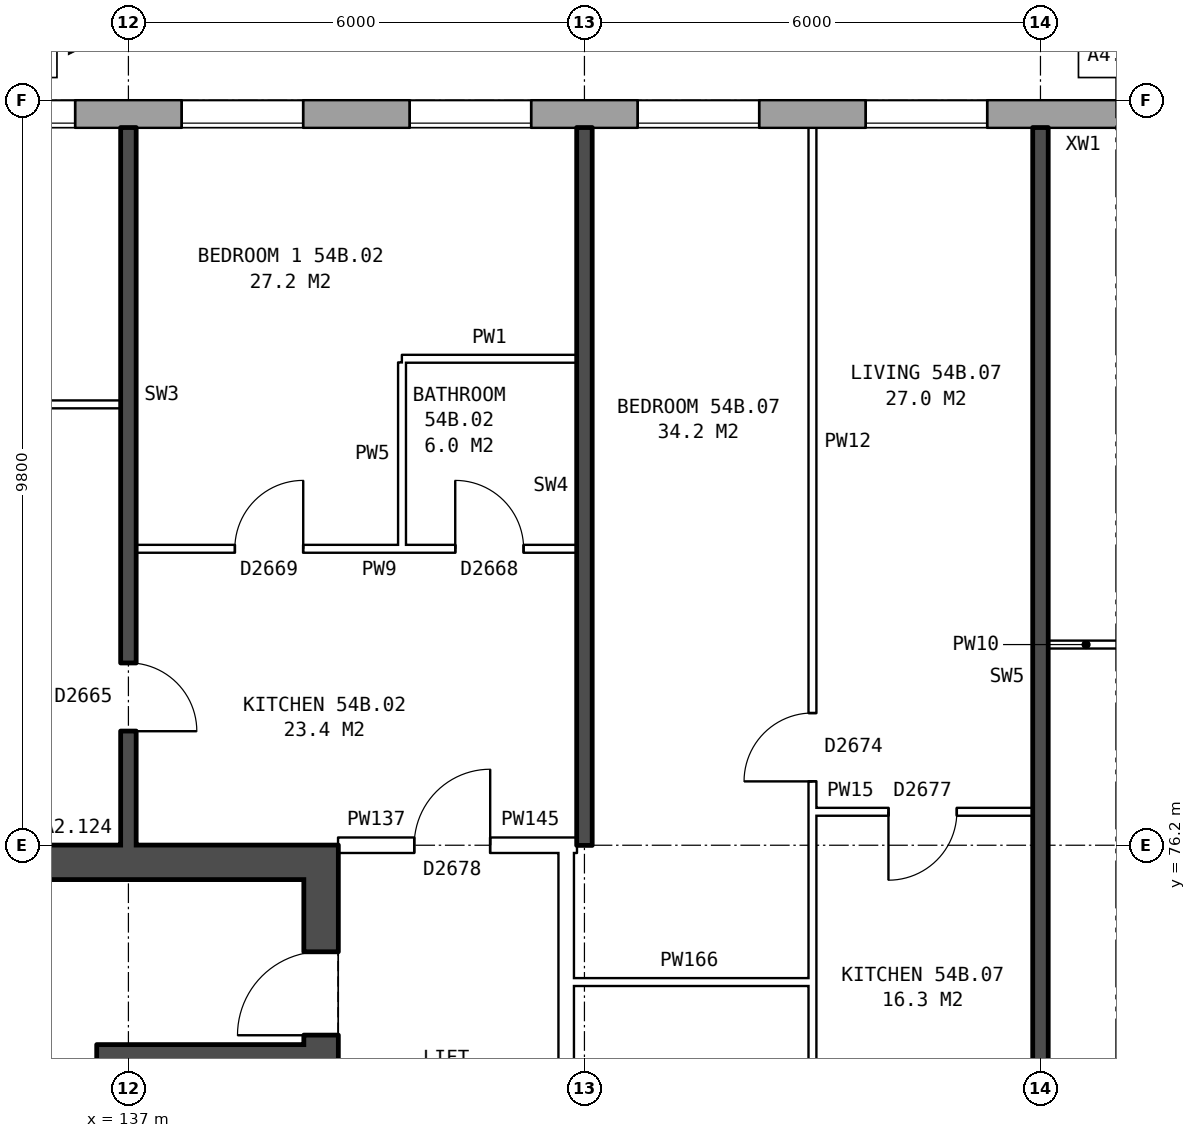
"""IFC4 building model, lengths in metres.
Left out: names, types, materials, properties, quantities, classifications, styles, units other than length and angle.
Written with IfcOpenShell. Run it as: python <this file> out.ifc"""

import sys

from ifc_helpers import new_model, si_unit, direction, frame, frame_2d, origin, place, context, subcontext, project, spatial, rectangle, extrude, element, fill, save


model = new_model("IFC4")
c1 = context("Model", 3, precision=1e-05, world=origin(), true_north=direction((0.0, 1.0)))
c2 = subcontext(c1, "Body", "Model", "MODEL_VIEW")
j1 = project(units=[si_unit("LENGTHUNIT", "METRE"), si_unit("PLANEANGLEUNIT", "RADIAN")], contexts=[c1])
p1 = place(None, origin())
s1 = spatial("IfcSite", under=j1, at=p1, CompositionType="ELEMENT")
p2 = place(p1, origin())
s2 = spatial("IfcBuilding", under=s1, at=p2, CompositionType="ELEMENT")
p3 = place(p2, frame((0.0, 0.0, 191.3)))
s3 = spatial("IfcBuildingStorey", under=s2, at=p3, CompositionType="ELEMENT", Elevation=191.3)
p4 = place(p3, frame((167.175, 85.82, 0.0), z_axis=(0.0, 0.0, 1.0), x_axis=(-1.0, 0.0, 0.0)))
e1 = element("IfcWall", 1, at=p4, inside=s3, PredefinedType="STANDARD", context=c2, shape_type="SweptSolid", body=[
    extrude(rectangle(XDim=33.101, YDim=0.36, at=frame_2d((16.55, 0.0))), origin(), (0.0, 0.0, 1.0), 2.85),
])
p5 = place(p4, frame((0.875, 0.0, 0.8)))
e2 = element("IfcOpeningElement", 2, at=p5, cuts=e1, PredefinedType="OPENING", context=c2, shape_type="SweptSolid", body=[
    extrude(rectangle(XDim=1.6, YDim=1.8, at=frame_2d((0.8, 0.9))), frame((0.0, 0.19, 0.0), z_axis=(0.0, -1.0, 0.0), x_axis=(1.0, 0.0, 0.0)), (0.0, 0.0, 1.0), 0.38),
])
p6 = place(p4, frame((3.875, 0.0, 0.8)))
e3 = element("IfcOpeningElement", 3, at=p6, cuts=e1, PredefinedType="OPENING", context=c2, shape_type="SweptSolid", body=[
    extrude(rectangle(XDim=1.6, YDim=1.8, at=frame_2d((0.8, 0.9))), frame((0.0, 0.19, 0.0), z_axis=(0.0, -1.0, 0.0), x_axis=(1.0, 0.0, 0.0)), (0.0, 0.0, 1.0), 0.38),
])
p7 = place(p4, frame((6.875, 0.0, 0.8)))
e4 = element("IfcOpeningElement", 4, at=p7, cuts=e1, PredefinedType="OPENING", context=c2, shape_type="SweptSolid", body=[
    extrude(rectangle(XDim=1.6, YDim=1.8, at=frame_2d((0.8, 0.9))), frame((0.0, 0.19, 0.0), z_axis=(0.0, -1.0, 0.0), x_axis=(1.0, 0.0, 0.0)), (0.0, 0.0, 1.0), 0.38),
])
p8 = place(p4, frame((9.875, 0.0, 0.8)))
e5 = element("IfcOpeningElement", 5, at=p8, cuts=e1, PredefinedType="OPENING", context=c2, shape_type="SweptSolid", body=[
    extrude(rectangle(XDim=1.6, YDim=1.8, at=frame_2d((0.8, 0.9))), frame((0.0, 0.19, 0.0), z_axis=(0.0, -1.0, 0.0), x_axis=(1.0, 0.0, 0.0)), (0.0, 0.0, 1.0), 0.38),
])
p9 = place(p4, frame((12.875, 0.0, 0.8)))
e6 = element("IfcOpeningElement", 6, at=p9, cuts=e1, PredefinedType="OPENING", context=c2, shape_type="SweptSolid", body=[
    extrude(rectangle(XDim=1.6, YDim=1.8, at=frame_2d((0.8, 0.9))), frame((0.0, 0.19, 0.0), z_axis=(0.0, -1.0, 0.0), x_axis=(1.0, 0.0, 0.0)), (0.0, 0.0, 1.0), 0.38),
])
p10 = place(p4, frame((15.925, 0.0, 0.15)))
e7 = element("IfcOpeningElement", 7, at=p10, cuts=e1, PredefinedType="OPENING", context=c2, shape_type="SweptSolid", body=[
    extrude(rectangle(XDim=1.2, YDim=1.2, at=frame_2d((0.6, 0.6))), frame((0.0, 0.19, 0.0), z_axis=(0.0, -1.0, 0.0), x_axis=(1.0, 0.0, 0.0)), (0.0, 0.0, 1.0), 0.38),
])
p11 = place(p4, frame((18.875, 0.0, 0.8)))
e8 = element("IfcOpeningElement", 8, at=p11, cuts=e1, PredefinedType="OPENING", context=c2, shape_type="SweptSolid", body=[
    extrude(rectangle(XDim=1.6, YDim=1.8, at=frame_2d((0.8, 0.9))), frame((0.0, 0.19, 0.0), z_axis=(0.0, -1.0, 0.0), x_axis=(1.0, 0.0, 0.0)), (0.0, 0.0, 1.0), 0.38),
])
p12 = place(p4, frame((21.875, 0.0, 0.8)))
e9 = element("IfcOpeningElement", 9, at=p12, cuts=e1, PredefinedType="OPENING", context=c2, shape_type="SweptSolid", body=[
    extrude(rectangle(XDim=1.6, YDim=1.8, at=frame_2d((0.8, 0.9))), frame((0.0, 0.19, 0.0), z_axis=(0.0, -1.0, 0.0), x_axis=(1.0, 0.0, 0.0)), (0.0, 0.0, 1.0), 0.38),
])
p13 = place(p4, frame((24.875, 0.0, 0.8)))
e10 = element("IfcOpeningElement", 10, at=p13, cuts=e1, PredefinedType="OPENING", context=c2, shape_type="SweptSolid", body=[
    extrude(rectangle(XDim=1.6, YDim=1.8, at=frame_2d((0.8, 0.9))), frame((0.0, 0.19, 0.0), z_axis=(0.0, -1.0, 0.0), x_axis=(1.0, 0.0, 0.0)), (0.0, 0.0, 1.0), 0.38),
])
p14 = place(p4, frame((27.875, 0.0, 0.8)))
e11 = element("IfcOpeningElement", 11, at=p14, cuts=e1, PredefinedType="OPENING", context=c2, shape_type="SweptSolid", body=[
    extrude(rectangle(XDim=1.6, YDim=1.8, at=frame_2d((0.8, 0.9))), frame((0.0, 0.19, 0.0), z_axis=(0.0, -1.0, 0.0), x_axis=(1.0, 0.0, 0.0)), (0.0, 0.0, 1.0), 0.38),
])
p15 = place(p4, frame((30.875, 0.0, 0.8)))
e12 = element("IfcOpeningElement", 12, at=p15, cuts=e1, PredefinedType="OPENING", context=c2, shape_type="SweptSolid", body=[
    extrude(rectangle(XDim=1.6, YDim=1.8, at=frame_2d((0.8, 0.9))), frame((0.0, 0.19, 0.0), z_axis=(0.0, -1.0, 0.0), x_axis=(1.0, 0.0, 0.0)), (0.0, 0.0, 1.0), 0.38),
])
p16 = place(p3, frame((139.535, 63.8, 0.0), z_axis=(0.0, 0.0, 1.0), x_axis=(0.0, 1.0, 0.0)))
e13 = element("IfcWall", 13, at=p16, inside=s3, PredefinedType="SHEAR", context=c2, shape_type="SweptSolid", body=[
    extrude(rectangle(XDim=12.4, YDim=0.45, at=frame_2d((6.2, 0.0))), origin(), (0.0, 0.0, 1.0), 2.85),
])
p17 = place(p16, frame((1.325, 0.0, 0.0)))
e14 = element("IfcOpeningElement", 14, at=p17, cuts=e13, PredefinedType="OPENING", context=c2, shape_type="SweptSolid", body=[
    extrude(rectangle(XDim=1.1, YDim=2.1, at=frame_2d((0.55, 1.05))), frame((0.0, 0.235, 0.0), z_axis=(0.0, -1.0, 0.0), x_axis=(1.0, 0.0, 0.0)), (0.0, 0.0, 1.0), 0.47),
])
p18 = place(p16, frame((3.6, 0.0, 0.0)))
e15 = element("IfcOpeningElement", 15, at=p18, cuts=e13, PredefinedType="OPENING", context=c2, shape_type="SweptSolid", body=[
    extrude(rectangle(XDim=1.1, YDim=2.1, at=frame_2d((0.55, 1.05))), frame((0.0, 0.235, 0.0), z_axis=(0.0, -1.0, 0.0), x_axis=(1.0, 0.0, 0.0)), (0.0, 0.0, 1.0), 0.47),
])
p19 = place(p16, frame((5.8, 0.0, 0.0)))
e16 = element("IfcOpeningElement", 16, at=p19, cuts=e13, PredefinedType="OPENING", context=c2, shape_type="SweptSolid", body=[
    extrude(rectangle(XDim=1.1, YDim=2.1, at=frame_2d((0.55, 1.05))), frame((0.0, 0.235, 0.0), z_axis=(0.0, -1.0, 0.0), x_axis=(1.0, 0.0, 0.0)), (0.0, 0.0, 1.0), 0.47),
])
p20 = place(p16, frame((9.9, 0.0, 0.0)))
e17 = element("IfcOpeningElement", 17, at=p20, cuts=e13, PredefinedType="OPENING", context=c2, shape_type="SweptSolid", body=[
    extrude(rectangle(XDim=1.1, YDim=2.1, at=frame_2d((0.55, 1.05))), frame((0.0, 0.235, 0.0), z_axis=(0.0, -1.0, 0.0), x_axis=(1.0, 0.0, 0.0)), (0.0, 0.0, 1.0), 0.47),
])
p21 = place(p16, frame((8.125, 0.0, 0.0)))
e18 = element("IfcOpeningElement", 18, at=p21, cuts=e13, PredefinedType="OPENING", context=c2, shape_type="SweptSolid", body=[
    extrude(rectangle(XDim=0.85, YDim=2.1, at=frame_2d((0.425, 1.05))), frame((0.0, 0.235, 0.0), z_axis=(0.0, -1.0, 0.0), x_axis=(1.0, 0.0, 0.0)), (0.0, 0.0, 1.0), 0.47),
])
p22 = place(p3, frame((139.31, 75.975, 0.0), z_axis=(0.0, 0.0, 1.0), x_axis=(-1.0, 0.0, 0.0)))
e19 = element("IfcWall", 19, at=p22, inside=s3, PredefinedType="SHEAR", context=c2, shape_type="SweptSolid", body=[
    extrude(rectangle(XDim=7.5, YDim=0.45, at=frame_2d((3.75, 0.0))), origin(), (0.0, 0.0, 1.0), 2.85),
])
p23 = place(p3, frame((139.31, 73.45, 0.0), z_axis=(0.0, 0.0, 1.0), x_axis=(-1.0, 0.0, 0.0)))
e20 = element("IfcWall", 20, at=p23, inside=s3, PredefinedType="SHEAR", context=c2, shape_type="SweptSolid", body=[
    extrude(rectangle(XDim=2.475, YDim=0.25, at=frame_2d((1.238, 0.0))), origin(), (0.0, 0.0, 1.0), 2.85),
])
p24 = place(p3, frame((136.71, 71.375, 0.0), z_axis=(0.0, 0.0, 1.0), x_axis=(0.0, 1.0, 0.0)))
e21 = element("IfcWall", 21, at=p24, inside=s3, PredefinedType="SHEAR", context=c2, shape_type="SweptSolid", body=[
    extrude(rectangle(XDim=2.2, YDim=0.25, at=frame_2d((1.1, 0.0))), origin(), (0.0, 0.0, 1.0), 2.85),
])
p25 = place(p3, frame((142.76, 63.9, 0.0), z_axis=(0.0, 0.0, 1.0), x_axis=(0.0, 1.0, 0.0)))
e22 = element("IfcWall", 22, at=p25, inside=s3, PredefinedType="PARTITIONING", context=c2, shape_type="SweptSolid", body=[
    extrude(rectangle(XDim=12.2, YDim=0.2, at=frame_2d((6.1, 0.0))), origin(), (0.0, 0.0, 1.0), 2.85),
])
p26 = place(p25, frame((5.1, 0.0, 0.0)))
e23 = element("IfcOpeningElement", 23, at=p26, cuts=e22, PredefinedType="OPENING", context=c2, shape_type="SweptSolid", body=[
    extrude(rectangle(XDim=2.0, YDim=2.1, at=frame_2d((1.0, 1.05))), frame((0.0, 0.11, 0.0), z_axis=(0.0, -1.0, 0.0), x_axis=(1.0, 0.0, 0.0)), (0.0, 0.0, 1.0), 0.22),
])
p27 = place(p3, frame((142.76, 74.4, 0.0), z_axis=(0.0, 0.0, 1.0), x_axis=(1.0, 0.0, 0.0)))
e24 = element("IfcWall", 24, at=p27, inside=s3, PredefinedType="PARTITIONING", context=c2, shape_type="SweptSolid", body=[
    extrude(rectangle(XDim=3.24, YDim=0.1, at=frame_2d((1.62, 0.0))), origin(), (0.0, 0.0, 1.0), 2.85),
])
p28 = place(p3, frame((139.76, 76.2, 0.0), z_axis=(0.0, 0.0, 1.0), x_axis=(1.0, 0.0, 0.0)))
e25 = element("IfcWall", 25, at=p28, inside=s3, PredefinedType="PARTITIONING", context=c2, shape_type="SweptSolid", body=[
    extrude(rectangle(XDim=3.0, YDim=0.2, at=frame_2d((1.5, 0.0))), origin(), (0.0, 0.0, 1.0), 2.85),
])
p29 = place(p28, frame((1.0, 0.0, 0.0)))
e26 = element("IfcOpeningElement", 26, at=p29, cuts=e25, PredefinedType="OPENING", context=c2, shape_type="SweptSolid", body=[
    extrude(rectangle(XDim=1.0, YDim=2.1, at=frame_2d((0.5, 1.05))), frame((0.0, 0.11, 0.0), z_axis=(0.0, -1.0, 0.0), x_axis=(1.0, 0.0, 0.0)), (0.0, 0.0, 1.0), 0.22),
])
p30 = place(p3, frame((142.76, 76.2, 0.0), z_axis=(0.0, 0.0, 1.0), x_axis=(1.0, 0.0, 0.0)))
e27 = element("IfcWall", 27, at=p30, inside=s3, PredefinedType="PARTITIONING", context=c2, shape_type="SweptSolid", body=[
    extrude(rectangle(XDim=0.14, YDim=0.2, at=frame_2d((0.07, 0.0))), origin(), (0.0, 0.0, 1.0), 2.85),
])
p31 = place(p3, frame((146.0, 76.64, 0.0), z_axis=(0.0, 0.0, 1.0), x_axis=(1.0, 0.0, 0.0)))
e28 = element("IfcWall", 28, at=p31, inside=s3, PredefinedType="PARTITIONING", context=c2, shape_type="SweptSolid", body=[
    extrude(rectangle(XDim=2.9, YDim=0.1, at=frame_2d((1.45, 0.0))), origin(), (0.0, 0.0, 1.0), 2.85),
])
p32 = place(p31, frame((1.0, 0.0, 0.0)))
e29 = element("IfcOpeningElement", 29, at=p32, cuts=e28, PredefinedType="OPENING", context=c2, shape_type="SweptSolid", body=[
    extrude(rectangle(XDim=0.9, YDim=2.1, at=frame_2d((0.45, 1.05))), frame((0.0, 0.06, 0.0), z_axis=(0.0, -1.0, 0.0), x_axis=(1.0, 0.0, 0.0)), (0.0, 0.0, 1.0), 0.12),
])
p33 = place(p3, frame((149.1, 78.84, 0.0), z_axis=(0.0, 0.0, 1.0), x_axis=(1.0, 0.0, 0.0)))
e30 = element("IfcWall", 30, at=p33, inside=s3, PredefinedType="PARTITIONING", context=c2, shape_type="SweptSolid", body=[
    extrude(rectangle(XDim=2.9, YDim=0.1, at=frame_2d((1.45, 0.0))), origin(), (0.0, 0.0, 1.0), 2.85),
])
p34 = place(p33, frame((1.0, 0.0, 0.0)))
e31 = element("IfcOpeningElement", 31, at=p34, cuts=e30, PredefinedType="OPENING", context=c2, shape_type="SweptSolid", body=[
    extrude(rectangle(XDim=0.9, YDim=2.1, at=frame_2d((0.45, 1.05))), frame((0.0, 0.06, 0.0), z_axis=(0.0, -1.0, 0.0), x_axis=(1.0, 0.0, 0.0)), (0.0, 0.0, 1.0), 0.12),
])
p35 = place(p3, frame((137.1, 80.1, 0.0), z_axis=(0.0, 0.0, 1.0), x_axis=(1.0, 0.0, 0.0)))
e32 = element("IfcWall", 32, at=p35, inside=s3, PredefinedType="PARTITIONING", context=c2, shape_type="SweptSolid", body=[
    extrude(rectangle(XDim=5.8, YDim=0.1, at=frame_2d((2.9, 0.0))), origin(), (0.0, 0.0, 1.0), 2.85),
])
p36 = place(p35, frame((1.3, 0.0, 0.0)))
e33 = element("IfcOpeningElement", 33, at=p36, cuts=e32, PredefinedType="OPENING", context=c2, shape_type="SweptSolid", body=[
    extrude(rectangle(XDim=0.9, YDim=2.1, at=frame_2d((0.45, 1.05))), frame((0.0, 0.06, 0.0), z_axis=(0.0, -1.0, 0.0), x_axis=(1.0, 0.0, 0.0)), (0.0, 0.0, 1.0), 0.12),
])
p37 = place(p35, frame((4.2, 0.0, 0.0)))
e34 = element("IfcOpeningElement", 34, at=p37, cuts=e32, PredefinedType="OPENING", context=c2, shape_type="SweptSolid", body=[
    extrude(rectangle(XDim=0.9, YDim=2.1, at=frame_2d((0.45, 1.05))), frame((0.0, 0.06, 0.0), z_axis=(0.0, -1.0, 0.0), x_axis=(1.0, 0.0, 0.0)), (0.0, 0.0, 1.0), 0.12),
])
p38 = place(p3, frame((131.36, 82.0, 0.0), z_axis=(0.0, 0.0, 1.0), x_axis=(1.0, 0.0, 0.0)))
e35 = element("IfcWall", 35, at=p38, inside=s3, PredefinedType="PARTITIONING", context=c2, shape_type="SweptSolid", body=[
    extrude(rectangle(XDim=5.54, YDim=0.1, at=frame_2d((2.77, 0.0))), origin(), (0.0, 0.0, 1.0), 2.85),
])
p39 = place(p38, frame((2.32, 0.0, 0.0)))
e36 = element("IfcOpeningElement", 36, at=p39, cuts=e35, PredefinedType="OPENING", context=c2, shape_type="SweptSolid", body=[
    extrude(rectangle(XDim=0.9, YDim=2.1, at=frame_2d((0.45, 1.05))), frame((0.0, 0.06, 0.0), z_axis=(0.0, -1.0, 0.0), x_axis=(1.0, 0.0, 0.0)), (0.0, 0.0, 1.0), 0.12),
])
p40 = place(p3, frame((140.6, 82.6, 0.0), z_axis=(0.0, 0.0, 1.0), x_axis=(1.0, 0.0, 0.0)))
e37 = element("IfcWall", 37, at=p40, inside=s3, PredefinedType="PARTITIONING", context=c2, shape_type="SweptSolid", body=[
    extrude(rectangle(XDim=2.3, YDim=0.1, at=frame_2d((1.15, 0.0))), origin(), (0.0, 0.0, 1.0), 2.85),
])
p41 = place(p3, frame((137.0, 76.2, 0.0), z_axis=(0.0, 0.0, 1.0), x_axis=(0.0, 1.0, 0.0)))
e38 = element("IfcWall", 38, at=p41, inside=s3, PredefinedType="SOLIDWALL", context=c2, shape_type="SweptSolid", body=[
    extrude(rectangle(XDim=9.44, YDim=0.2, at=frame_2d((4.72, 0.0))), origin(), (0.0, 0.0, 1.0), 2.85),
])
p42 = place(p41, frame((1.5, 0.0, 0.0)))
e39 = element("IfcOpeningElement", 39, at=p42, cuts=e38, PredefinedType="OPENING", context=c2, shape_type="SweptSolid", body=[
    extrude(rectangle(XDim=0.9, YDim=2.1, at=frame_2d((0.45, 1.05))), frame((0.0, 0.11, 0.0), z_axis=(0.0, -1.0, 0.0), x_axis=(1.0, 0.0, 0.0)), (0.0, 0.0, 1.0), 0.22),
])
p43 = place(p3, frame((140.6, 80.15, 0.0), z_axis=(0.0, 0.0, 1.0), x_axis=(0.0, 1.0, 0.0)))
e40 = element("IfcWall", 40, at=p43, inside=s3, PredefinedType="PARTITIONING", context=c2, shape_type="SweptSolid", body=[
    extrude(rectangle(XDim=2.4, YDim=0.1, at=frame_2d((1.2, 0.0))), origin(), (0.0, 0.0, 1.0), 2.85),
])
p44 = place(p3, frame((143.0, 76.2, 0.0), z_axis=(0.0, 0.0, 1.0), x_axis=(0.0, 1.0, 0.0)))
e41 = element("IfcWall", 41, at=p44, inside=s3, PredefinedType="SOLIDWALL", context=c2, shape_type="SweptSolid", body=[
    extrude(rectangle(XDim=9.44, YDim=0.2, at=frame_2d((4.72, 0.0))), origin(), (0.0, 0.0, 1.0), 2.85),
])
p45 = place(p3, frame((146.0, 71.3, 0.0), z_axis=(0.0, 0.0, 1.0), x_axis=(0.0, 1.0, 0.0)))
e42 = element("IfcWall", 42, at=p45, inside=s3, PredefinedType="PARTITIONING", context=c2, shape_type="SweptSolid", body=[
    extrude(rectangle(XDim=14.34, YDim=0.1, at=frame_2d((7.17, 0.0))), origin(), (0.0, 0.0, 1.0), 2.85),
])
p46 = place(p45, frame((5.74, 0.0, 0.0)))
e43 = element("IfcOpeningElement", 43, at=p46, cuts=e42, PredefinedType="OPENING", context=c2, shape_type="SweptSolid", body=[
    extrude(rectangle(XDim=0.9, YDim=2.1, at=frame_2d((0.45, 1.05))), frame((0.0, 0.06, 0.0), z_axis=(0.0, -1.0, 0.0), x_axis=(1.0, 0.0, 0.0)), (0.0, 0.0, 1.0), 0.12),
])
p47 = place(p45, frame((0.4, 0.0, 0.0)))
e44 = element("IfcOpeningElement", 44, at=p47, cuts=e42, PredefinedType="OPENING", context=c2, shape_type="SweptSolid", body=[
    extrude(rectangle(XDim=0.9, YDim=2.1, at=frame_2d((0.45, 1.05))), frame((0.0, 0.06, 0.0), z_axis=(0.0, -1.0, 0.0), x_axis=(1.0, 0.0, 0.0)), (0.0, 0.0, 1.0), 0.12),
])
p48 = place(p3, frame((149.0, 71.2, 0.0), z_axis=(0.0, 0.0, 1.0), x_axis=(0.0, 1.0, 0.0)))
e45 = element("IfcWall", 45, at=p48, inside=s3, PredefinedType="SOLIDWALL", context=c2, shape_type="SweptSolid", body=[
    extrude(rectangle(XDim=14.44, YDim=0.2, at=frame_2d((7.22, 0.0))), origin(), (0.0, 0.0, 1.0), 2.85),
])
p49 = place(p11, origin())
e46 = element("IfcWindow", 46, at=p49, inside=s3, PartitioningType="SINGLE_PANEL", PredefinedType="WINDOW", context=c2, shape_type="SweptSolid", body=[
    extrude(rectangle(XDim=1.6, YDim=1.8, at=frame_2d((0.8, 0.9))), frame((0.0, 0.15, 0.0), z_axis=(0.0, -1.0, 0.0), x_axis=(1.0, 0.0, 0.0)), (0.0, 0.0, 1.0), 0.06),
])
fill(e8, e46)
p50 = place(p12, origin())
e47 = element("IfcWindow", 47, at=p50, inside=s3, PartitioningType="SINGLE_PANEL", PredefinedType="WINDOW", context=c2, shape_type="SweptSolid", body=[
    extrude(rectangle(XDim=1.6, YDim=1.8, at=frame_2d((0.8, 0.9))), frame((0.0, 0.15, 0.0), z_axis=(0.0, -1.0, 0.0), x_axis=(1.0, 0.0, 0.0)), (0.0, 0.0, 1.0), 0.06),
])
fill(e9, e47)
p51 = place(p13, origin())
e48 = element("IfcWindow", 48, at=p51, inside=s3, PartitioningType="SINGLE_PANEL", PredefinedType="WINDOW", context=c2, shape_type="SweptSolid", body=[
    extrude(rectangle(XDim=1.6, YDim=1.8, at=frame_2d((0.8, 0.9))), frame((0.0, 0.15, 0.0), z_axis=(0.0, -1.0, 0.0), x_axis=(1.0, 0.0, 0.0)), (0.0, 0.0, 1.0), 0.06),
])
fill(e10, e48)
p52 = place(p14, origin())
e49 = element("IfcWindow", 49, at=p52, inside=s3, PartitioningType="SINGLE_PANEL", PredefinedType="WINDOW", context=c2, shape_type="SweptSolid", body=[
    extrude(rectangle(XDim=1.6, YDim=1.8, at=frame_2d((0.8, 0.9))), frame((0.0, 0.15, 0.0), z_axis=(0.0, -1.0, 0.0), x_axis=(1.0, 0.0, 0.0)), (0.0, 0.0, 1.0), 0.06),
])
fill(e11, e49)
p53 = place(p15, origin())
e50 = element("IfcWindow", 50, at=p53, inside=s3, PartitioningType="SINGLE_PANEL", PredefinedType="WINDOW", context=c2, shape_type="SweptSolid", body=[
    extrude(rectangle(XDim=1.6, YDim=1.8, at=frame_2d((0.8, 0.9))), frame((0.0, 0.15, 0.0), z_axis=(0.0, -1.0, 0.0), x_axis=(1.0, 0.0, 0.0)), (0.0, 0.0, 1.0), 0.06),
])
fill(e12, e50)
p54 = place(p20, origin())
e51 = element("IfcDoor", 51, at=p54, inside=s3, OperationType="SINGLE_SWING_LEFT", PredefinedType="DOOR", context=c2, shape_type="SweptSolid", body=[
    extrude(rectangle(XDim=1.1, YDim=2.1, at=frame_2d((0.55, 1.05))), frame((0.0, 0.21, 0.0), z_axis=(0.0, -1.0, 0.0), x_axis=(1.0, 0.0, 0.0)), (0.0, 0.0, 1.0), 0.05),
])
fill(e17, e51)
p55 = place(p36, origin())
e52 = element("IfcDoor", 52, at=p55, inside=s3, OperationType="SINGLE_SWING_RIGHT", PredefinedType="DOOR", context=c2, shape_type="SweptSolid", body=[
    extrude(rectangle(XDim=0.9, YDim=2.1, at=frame_2d((0.45, 1.05))), frame((0.0, 0.025, 0.0), z_axis=(0.0, -1.0, 0.0), x_axis=(1.0, 0.0, 0.0)), (0.0, 0.0, 1.0), 0.05),
])
fill(e33, e52)
p56 = place(p29, origin())
e53 = element("IfcDoor", 53, at=p56, inside=s3, OperationType="SINGLE_SWING_RIGHT", PredefinedType="DOOR", context=c2, shape_type="SweptSolid", body=[
    extrude(rectangle(XDim=1.0, YDim=2.1, at=frame_2d((0.5, 1.05))), frame((0.0, 0.025, 0.0), z_axis=(0.0, -1.0, 0.0), x_axis=(1.0, 0.0, 0.0)), (0.0, 0.0, 1.0), 0.05),
])
fill(e26, e53)
p57 = place(p42, frame((0.9, 0.0, 0.0), z_axis=(0.0, 0.0, 1.0), x_axis=(-1.0, 0.0, 0.0)))
e54 = element("IfcDoor", 54, at=p57, inside=s3, OperationType="SINGLE_SWING_RIGHT", PredefinedType="DOOR", context=c2, shape_type="SweptSolid", body=[
    extrude(rectangle(XDim=0.9, YDim=2.1, at=frame_2d((0.45, 1.05))), frame((0.0, 0.025, 0.0), z_axis=(0.0, -1.0, 0.0), x_axis=(1.0, 0.0, 0.0)), (0.0, 0.0, 1.0), 0.05),
])
fill(e39, e54)
p58 = place(p37, origin())
e55 = element("IfcDoor", 55, at=p58, inside=s3, OperationType="SINGLE_SWING_LEFT", PredefinedType="DOOR", context=c2, shape_type="SweptSolid", body=[
    extrude(rectangle(XDim=0.9, YDim=2.1, at=frame_2d((0.45, 1.05))), frame((0.0, 0.025, 0.0), z_axis=(0.0, -1.0, 0.0), x_axis=(1.0, 0.0, 0.0)), (0.0, 0.0, 1.0), 0.05),
])
fill(e34, e55)
p59 = place(p46, origin())
e56 = element("IfcDoor", 56, at=p59, inside=s3, OperationType="SINGLE_SWING_LEFT", PredefinedType="DOOR", context=c2, shape_type="SweptSolid", body=[
    extrude(rectangle(XDim=0.9, YDim=2.1, at=frame_2d((0.45, 1.05))), frame((0.0, 0.025, 0.0), z_axis=(0.0, -1.0, 0.0), x_axis=(1.0, 0.0, 0.0)), (0.0, 0.0, 1.0), 0.05),
])
fill(e43, e56)
p60 = place(p32, frame((0.9, 0.0, 0.0), z_axis=(0.0, 0.0, 1.0), x_axis=(-1.0, 0.0, 0.0)))
e57 = element("IfcDoor", 57, at=p60, inside=s3, OperationType="SINGLE_SWING_RIGHT", PredefinedType="DOOR", context=c2, shape_type="SweptSolid", body=[
    extrude(rectangle(XDim=0.9, YDim=2.1, at=frame_2d((0.45, 1.05))), frame((0.0, 0.025, 0.0), z_axis=(0.0, -1.0, 0.0), x_axis=(1.0, 0.0, 0.0)), (0.0, 0.0, 1.0), 0.05),
])
fill(e29, e57)
save(model, sys.argv[1])
